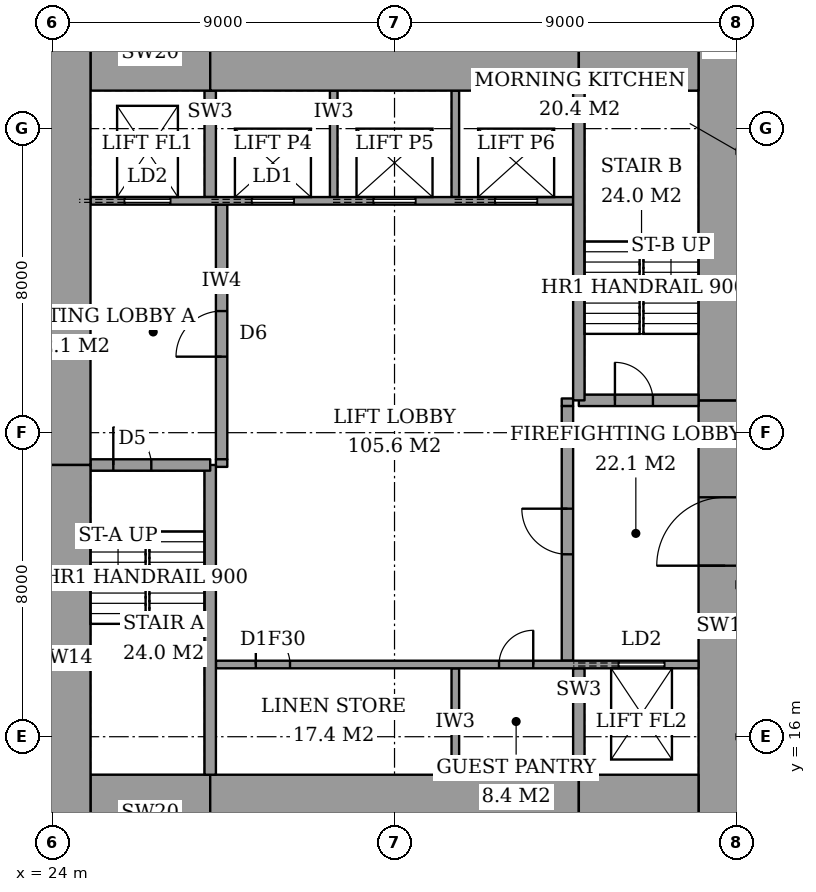
"""IFC4 building model, lengths in metres.
Left out: names, types, materials, properties, quantities, classifications, styles, units other than length and angle.
Written with IfcOpenShell. Run it as: python <this file> out.ifc"""

import sys

from ifc_helpers import new_model, si_unit, direction, frame, frame_2d, origin, place, context, subcontext, project, spatial, rectangle, extrude, element, fill, save


model = new_model("IFC4")
c1 = context("Model", 3, precision=1e-05, world=origin(), true_north=direction((0.0, 1.0)))
c2 = subcontext(c1, "Body", "Model", "MODEL_VIEW")
j1 = project(units=[si_unit("LENGTHUNIT", "METRE"), si_unit("PLANEANGLEUNIT", "RADIAN")], contexts=[c1])
p1 = place(None, origin())
s1 = spatial("IfcSite", under=j1, at=p1, CompositionType="ELEMENT")
p2 = place(p1, origin())
s2 = spatial("IfcBuilding", under=s1, at=p2, CompositionType="ELEMENT")
p3 = place(p2, frame((0.0, 0.0, 270.0)))
s3 = spatial("IfcBuildingStorey", under=s2, at=p3, CompositionType="ELEMENT", Elevation=270.0)
p4 = place(p3, frame((25.0, 14.0, 0.0), z_axis=(0.0, 0.0, 1.0), x_axis=(1.0, 0.0, 0.0)))
e1 = element("IfcWall", 1, at=p4, inside=s3, PredefinedType="SHEAR", context=c2, shape_type="SweptSolid", body=[
    extrude(rectangle(XDim=3.15, YDim=2.0, at=frame_2d((1.575, 0.0))), origin(), (0.0, 0.0, 1.0), 3.6),
])
p5 = place(p3, frame((28.15, 14.0, 0.0), z_axis=(0.0, 0.0, 1.0), x_axis=(1.0, 0.0, 0.0)))
e2 = element("IfcWall", 2, at=p5, inside=s3, PredefinedType="SHEAR", context=c2, shape_type="SweptSolid", body=[
    extrude(rectangle(XDim=9.7, YDim=2.0, at=frame_2d((4.85, 0.0))), origin(), (0.0, 0.0, 1.0), 3.6),
])
for number, where, z_axis, x_axis in (
    (3, (37.85, 14.0, 0.0), (0.0, 0.0, 1.0), (1.0, 0.0, 0.0)),
    (4, (25.0, 34.0, 0.0), (0.0, 0.0, 1.0), (1.0, 0.0, 0.0)),
):
    element("IfcWall", number, at=place(p3, frame(where, z_axis=z_axis, x_axis=x_axis)), inside=s3, PredefinedType="SHEAR", context=c2, shape_type="SweptSolid", body=[
        extrude(rectangle(XDim=3.15, YDim=2.0, at=frame_2d((1.575, 0.0))), origin(), (0.0, 0.0, 1.0), 3.6),
    ])
p6 = place(p3, frame((28.15, 34.0, 0.0), z_axis=(0.0, 0.0, 1.0), x_axis=(1.0, 0.0, 0.0)))
e5 = element("IfcWall", 5, at=p6, inside=s3, PredefinedType="SHEAR", context=c2, shape_type="SweptSolid", body=[
    extrude(rectangle(XDim=9.7, YDim=2.0, at=frame_2d((4.85, 0.0))), origin(), (0.0, 0.0, 1.0), 3.6),
])
p7 = place(p3, frame((37.85, 34.0, 0.0), z_axis=(0.0, 0.0, 1.0), x_axis=(1.0, 0.0, 0.0)))
e6 = element("IfcWall", 6, at=p7, inside=s3, PredefinedType="SHEAR", context=c2, shape_type="SweptSolid", body=[
    extrude(rectangle(XDim=3.15, YDim=2.0, at=frame_2d((1.575, 0.0))), origin(), (0.0, 0.0, 1.0), 3.6),
])
p8 = place(p3, frame((24.3, 13.0, 0.0), z_axis=(0.0, 0.0, 1.0), x_axis=(0.0, 1.0, 0.0)))
e7 = element("IfcWall", 7, at=p8, inside=s3, PredefinedType="SHEAR", context=c2, shape_type="SweptSolid", body=[
    extrude(rectangle(XDim=10.15, YDim=1.4, at=frame_2d((5.075, 0.0))), origin(), (0.0, 0.0, 1.0), 3.6),
])
p9 = place(p3, frame((24.3, 23.15, 0.0), z_axis=(0.0, 0.0, 1.0), x_axis=(0.0, 1.0, 0.0)))
e8 = element("IfcWall", 8, at=p9, inside=s3, PredefinedType="SHEAR", context=c2, shape_type="SweptSolid", body=[
    extrude(rectangle(XDim=11.85, YDim=1.4, at=frame_2d((5.925, 0.0))), origin(), (0.0, 0.0, 1.0), 3.6),
])
p10 = place(p3, frame((41.7, 13.0, 0.0), z_axis=(0.0, 0.0, 1.0), x_axis=(0.0, 1.0, 0.0)))
e9 = element("IfcWall", 9, at=p10, inside=s3, PredefinedType="SHEAR", context=c2, shape_type="SweptSolid", body=[
    extrude(rectangle(XDim=11.85, YDim=1.4, at=frame_2d((5.925, 0.0))), origin(), (0.0, 0.0, 1.0), 3.6),
])
p11 = place(p10, frame((7.5, 0.0, 0.0)))
e10 = element("IfcOpeningElement", 10, at=p11, cuts=e9, PredefinedType="OPENING", context=c2, shape_type="SweptSolid", body=[
    extrude(rectangle(XDim=1.8, YDim=2.4, at=frame_2d((0.9, 1.2))), frame((0.0, 0.71, 0.0), z_axis=(0.0, -1.0, 0.0), x_axis=(1.0, 0.0, 0.0)), (0.0, 0.0, 1.0), 1.42),
])
p12 = place(p3, frame((41.7, 24.85, 0.0), z_axis=(0.0, 0.0, 1.0), x_axis=(0.0, 1.0, 0.0)))
e11 = element("IfcWall", 11, at=p12, inside=s3, PredefinedType="SHEAR", context=c2, shape_type="SweptSolid", body=[
    extrude(rectangle(XDim=10.15, YDim=1.4, at=frame_2d((5.075, 0.0))), origin(), (0.0, 0.0, 1.0), 3.6),
])
p13 = place(p3, frame((28.15, 15.0, 0.0), z_axis=(0.0, 0.0, 1.0), x_axis=(0.0, 1.0, 0.0)))
e12 = element("IfcWall", 12, at=p13, inside=s3, PredefinedType="SHEAR", context=c2, shape_type="SweptSolid", body=[
    extrude(rectangle(XDim=8.15, YDim=0.3, at=frame_2d((4.075, 0.0))), origin(), (0.0, 0.0, 1.0), 3.6),
])
p14 = place(p3, frame((25.0, 23.15, 0.0), z_axis=(0.0, 0.0, 1.0), x_axis=(1.0, 0.0, 0.0)))
e13 = element("IfcWall", 13, at=p14, inside=s3, PredefinedType="SHEAR", context=c2, shape_type="SweptSolid", body=[
    extrude(rectangle(XDim=3.15, YDim=0.3, at=frame_2d((1.575, 0.0))), origin(), (0.0, 0.0, 1.0), 3.6),
])
p15 = place(p14, frame((0.6, 0.0, 0.0)))
e14 = element("IfcOpeningElement", 14, at=p15, cuts=e13, PredefinedType="OPENING", context=c2, shape_type="SweptSolid", body=[
    extrude(rectangle(XDim=1.0, YDim=2.1, at=frame_2d((0.5, 1.05))), frame((0.0, 0.16, 0.0), z_axis=(0.0, -1.0, 0.0), x_axis=(1.0, 0.0, 0.0)), (0.0, 0.0, 1.0), 0.32),
])
p16 = place(p3, frame((37.85, 24.85, 0.0), z_axis=(0.0, 0.0, 1.0), x_axis=(0.0, 1.0, 0.0)))
e15 = element("IfcWall", 15, at=p16, inside=s3, PredefinedType="SHEAR", context=c2, shape_type="SweptSolid", body=[
    extrude(rectangle(XDim=8.15, YDim=0.3, at=frame_2d((4.075, 0.0))), origin(), (0.0, 0.0, 1.0), 3.6),
])
p17 = place(p3, frame((37.85, 24.85, 0.0), z_axis=(0.0, 0.0, 1.0), x_axis=(1.0, 0.0, 0.0)))
e16 = element("IfcWall", 16, at=p17, inside=s3, PredefinedType="SHEAR", context=c2, shape_type="SweptSolid", body=[
    extrude(rectangle(XDim=3.15, YDim=0.3, at=frame_2d((1.575, 0.0))), origin(), (0.0, 0.0, 1.0), 3.6),
])
p18 = place(p17, frame((0.95, 0.0, 0.0)))
e17 = element("IfcOpeningElement", 17, at=p18, cuts=e16, PredefinedType="OPENING", context=c2, shape_type="SweptSolid", body=[
    extrude(rectangle(XDim=1.0, YDim=2.1, at=frame_2d((0.5, 1.05))), frame((0.0, 0.16, 0.0), z_axis=(0.0, -1.0, 0.0), x_axis=(1.0, 0.0, 0.0)), (0.0, 0.0, 1.0), 0.32),
])
p19 = place(p3, frame((28.45, 23.3, 0.0), z_axis=(0.0, 0.0, 1.0), x_axis=(0.0, 1.0, 0.0)))
e18 = element("IfcWall", 18, at=p19, inside=s3, PredefinedType="PARTITIONING", context=c2, shape_type="SweptSolid", body=[
    extrude(rectangle(XDim=6.7, YDim=0.3, at=frame_2d((3.35, 0.0))), origin(), (0.0, 0.0, 1.0), 3.6),
])
p20 = place(p19, frame((2.7, 0.0, 0.0)))
e19 = element("IfcOpeningElement", 19, at=p20, cuts=e18, PredefinedType="OPENING", context=c2, shape_type="SweptSolid", body=[
    extrude(rectangle(XDim=1.2, YDim=2.1, at=frame_2d((0.6, 1.05))), frame((0.0, 0.16, 0.0), z_axis=(0.0, -1.0, 0.0), x_axis=(1.0, 0.0, 0.0)), (0.0, 0.0, 1.0), 0.32),
])
p21 = place(p3, frame((37.55, 18.0, 0.0), z_axis=(0.0, 0.0, 1.0), x_axis=(0.0, 1.0, 0.0)))
e20 = element("IfcWall", 20, at=p21, inside=s3, PredefinedType="PARTITIONING", context=c2, shape_type="SweptSolid", body=[
    extrude(rectangle(XDim=6.7, YDim=0.3, at=frame_2d((3.35, 0.0))), origin(), (0.0, 0.0, 1.0), 3.6),
])
p22 = place(p21, frame((2.8, 0.0, 0.0)))
e21 = element("IfcOpeningElement", 21, at=p22, cuts=e20, PredefinedType="OPENING", context=c2, shape_type="SweptSolid", body=[
    extrude(rectangle(XDim=1.2, YDim=2.1, at=frame_2d((0.6, 1.05))), frame((0.0, 0.16, 0.0), z_axis=(0.0, -1.0, 0.0), x_axis=(1.0, 0.0, 0.0)), (0.0, 0.0, 1.0), 0.32),
])
p23 = place(p3, frame((28.3, 17.9, 0.0), z_axis=(0.0, 0.0, 1.0), x_axis=(1.0, 0.0, 0.0)))
e22 = element("IfcWall", 22, at=p23, inside=s3, PredefinedType="PARTITIONING", context=c2, shape_type="SweptSolid", body=[
    extrude(rectangle(XDim=12.7, YDim=0.2, at=frame_2d((6.35, 0.0))), origin(), (0.0, 0.0, 1.0), 3.6),
])
p24 = place(p23, frame((1.05, 0.0, 0.0)))
e23 = element("IfcOpeningElement", 23, at=p24, cuts=e22, PredefinedType="OPENING", context=c2, shape_type="SweptSolid", body=[
    extrude(rectangle(XDim=0.9, YDim=2.1, at=frame_2d((0.45, 1.05))), frame((0.0, 0.11, 0.0), z_axis=(0.0, -1.0, 0.0), x_axis=(1.0, 0.0, 0.0)), (0.0, 0.0, 1.0), 0.22),
])
p25 = place(p23, frame((7.45, 0.0, 0.0)))
e24 = element("IfcOpeningElement", 24, at=p25, cuts=e22, PredefinedType="OPENING", context=c2, shape_type="SweptSolid", body=[
    extrude(rectangle(XDim=0.9, YDim=2.1, at=frame_2d((0.45, 1.05))), frame((0.0, 0.11, 0.0), z_axis=(0.0, -1.0, 0.0), x_axis=(1.0, 0.0, 0.0)), (0.0, 0.0, 1.0), 0.22),
])
p26 = place(p23, frame((10.6, 0.0, 0.0)))
e25 = element("IfcOpeningElement", 25, at=p26, cuts=e22, PredefinedType="OPENING", context=c2, shape_type="SweptSolid", body=[
    extrude(rectangle(XDim=1.2, YDim=2.1, at=frame_2d((0.6, 1.05))), frame((0.0, 0.11, 0.0), z_axis=(0.0, -1.0, 0.0), x_axis=(1.0, 0.0, 0.0)), (0.0, 0.0, 1.0), 0.22),
])
p27 = place(p3, frame((25.0, 30.1, 0.0), z_axis=(0.0, 0.0, 1.0), x_axis=(1.0, 0.0, 0.0)))
e26 = element("IfcWall", 26, at=p27, inside=s3, PredefinedType="PARTITIONING", context=c2, shape_type="SweptSolid", body=[
    extrude(rectangle(XDim=12.7, YDim=0.2, at=frame_2d((6.35, 0.0))), origin(), (0.0, 0.0, 1.0), 3.6),
])
p28 = place(p27, frame((4.25, 0.0, 0.0)))
e27 = element("IfcOpeningElement", 27, at=p28, cuts=e26, PredefinedType="OPENING", context=c2, shape_type="SweptSolid", body=[
    extrude(rectangle(XDim=1.1, YDim=2.1, at=frame_2d((0.55, 1.05))), frame((0.0, 0.11, 0.0), z_axis=(0.0, -1.0, 0.0), x_axis=(1.0, 0.0, 0.0)), (0.0, 0.0, 1.0), 0.22),
])
p29 = place(p27, frame((7.45, 0.0, 0.0)))
e28 = element("IfcOpeningElement", 28, at=p29, cuts=e26, PredefinedType="OPENING", context=c2, shape_type="SweptSolid", body=[
    extrude(rectangle(XDim=1.1, YDim=2.1, at=frame_2d((0.55, 1.05))), frame((0.0, 0.11, 0.0), z_axis=(0.0, -1.0, 0.0), x_axis=(1.0, 0.0, 0.0)), (0.0, 0.0, 1.0), 0.22),
])
p30 = place(p27, frame((10.65, 0.0, 0.0)))
e29 = element("IfcOpeningElement", 29, at=p30, cuts=e26, PredefinedType="OPENING", context=c2, shape_type="SweptSolid", body=[
    extrude(rectangle(XDim=1.1, YDim=2.1, at=frame_2d((0.55, 1.05))), frame((0.0, 0.11, 0.0), z_axis=(0.0, -1.0, 0.0), x_axis=(1.0, 0.0, 0.0)), (0.0, 0.0, 1.0), 0.22),
])
p31 = place(p27, frame((0.9, 0.0, 0.0)))
e30 = element("IfcOpeningElement", 30, at=p31, cuts=e26, PredefinedType="OPENING", context=c2, shape_type="SweptSolid", body=[
    extrude(rectangle(XDim=1.2, YDim=2.1, at=frame_2d((0.6, 1.05))), frame((0.0, 0.11, 0.0), z_axis=(0.0, -1.0, 0.0), x_axis=(1.0, 0.0, 0.0)), (0.0, 0.0, 1.0), 0.22),
])
p32 = place(p3, frame((34.6, 15.0, 0.0), z_axis=(0.0, 0.0, 1.0), x_axis=(0.0, 1.0, 0.0)))
e31 = element("IfcWall", 31, at=p32, inside=s3, PredefinedType="PARTITIONING", context=c2, shape_type="SweptSolid", body=[
    extrude(rectangle(XDim=2.8, YDim=0.2, at=frame_2d((1.4, 0.0))), origin(), (0.0, 0.0, 1.0), 3.6),
])
p33 = place(p3, frame((37.85, 15.0, 0.0), z_axis=(0.0, 0.0, 1.0), x_axis=(0.0, 1.0, 0.0)))
e32 = element("IfcWall", 32, at=p33, inside=s3, PredefinedType="SHEAR", context=c2, shape_type="SweptSolid", body=[
    extrude(rectangle(XDim=2.8, YDim=0.3, at=frame_2d((1.4, 0.0))), origin(), (0.0, 0.0, 1.0), 3.6),
])
for number, where, z_axis, x_axis in (
    (33, (31.4, 30.2, 0.0), (0.0, 0.0, 1.0), (0.0, 1.0, 0.0)),
    (34, (34.6, 30.2, 0.0), (0.0, 0.0, 1.0), (0.0, 1.0, 0.0)),
):
    element("IfcWall", number, at=place(p3, frame(where, z_axis=z_axis, x_axis=x_axis)), inside=s3, PredefinedType="PARTITIONING", context=c2, shape_type="SweptSolid", body=[
        extrude(rectangle(XDim=2.8, YDim=0.2, at=frame_2d((1.4, 0.0))), origin(), (0.0, 0.0, 1.0), 3.6),
    ])
p34 = place(p3, frame((28.15, 30.2, 0.0), z_axis=(0.0, 0.0, 1.0), x_axis=(0.0, 1.0, 0.0)))
e35 = element("IfcWall", 35, at=p34, inside=s3, PredefinedType="SHEAR", context=c2, shape_type="SweptSolid", body=[
    extrude(rectangle(XDim=2.8, YDim=0.3, at=frame_2d((1.4, 0.0))), origin(), (0.0, 0.0, 1.0), 3.6),
])
for number, where, z_axis, x_axis in (
    (36, (28.3, 23.2, 0.0), (0.0, 0.0, 1.0), (1.0, 0.0, 0.0)),
    (37, (37.4, 24.8, 0.0), (0.0, 0.0, 1.0), (1.0, 0.0, 0.0)),
):
    element("IfcWall", number, at=place(p3, frame(where, z_axis=z_axis, x_axis=x_axis)), inside=s3, PredefinedType="PARTITIONING", context=c2, shape_type="SweptSolid", body=[
        extrude(rectangle(XDim=0.3, YDim=0.2, at=frame_2d((0.15, 0.0))), origin(), (0.0, 0.0, 1.0), 3.6),
    ])
p35 = place(p15, origin())
e38 = element("IfcDoor", 38, at=p35, inside=s3, OperationType="SINGLE_SWING_RIGHT", PredefinedType="DOOR", context=c2, shape_type="SweptSolid", body=[
    extrude(rectangle(XDim=1.0, YDim=2.1, at=frame_2d((0.5, 1.05))), frame((0.0, 0.025, 0.0), z_axis=(0.0, -1.0, 0.0), x_axis=(1.0, 0.0, 0.0)), (0.0, 0.0, 1.0), 0.05),
])
fill(e14, e38)
p36 = place(p18, origin())
e39 = element("IfcDoor", 39, at=p36, inside=s3, OperationType="SINGLE_SWING_RIGHT", PredefinedType="DOOR", context=c2, shape_type="SweptSolid", body=[
    extrude(rectangle(XDim=1.0, YDim=2.1, at=frame_2d((0.5, 1.05))), frame((0.0, 0.025, 0.0), z_axis=(0.0, -1.0, 0.0), x_axis=(1.0, 0.0, 0.0)), (0.0, 0.0, 1.0), 0.05),
])
fill(e17, e39)
p37 = place(p20, origin())
e40 = element("IfcDoor", 40, at=p37, inside=s3, OperationType="SINGLE_SWING_RIGHT", PredefinedType="DOOR", context=c2, shape_type="SweptSolid", body=[
    extrude(rectangle(XDim=1.2, YDim=2.1, at=frame_2d((0.6, 1.05))), frame((0.0, 0.025, 0.0), z_axis=(0.0, -1.0, 0.0), x_axis=(1.0, 0.0, 0.0)), (0.0, 0.0, 1.0), 0.05),
])
fill(e19, e40)
p38 = place(p22, origin())
e41 = element("IfcDoor", 41, at=p38, inside=s3, OperationType="SINGLE_SWING_LEFT", PredefinedType="DOOR", context=c2, shape_type="SweptSolid", body=[
    extrude(rectangle(XDim=1.2, YDim=2.1, at=frame_2d((0.6, 1.05))), frame((0.0, 0.025, 0.0), z_axis=(0.0, -1.0, 0.0), x_axis=(1.0, 0.0, 0.0)), (0.0, 0.0, 1.0), 0.05),
])
fill(e21, e41)
p39 = place(p11, origin())
e42 = element("IfcDoor", 42, at=p39, inside=s3, OperationType="DOUBLE_DOOR_DOUBLE_SWING", PredefinedType="DOOR", context=c2, shape_type="SweptSolid", body=[
    extrude(rectangle(XDim=1.8, YDim=2.4, at=frame_2d((0.9, 1.2))), frame((0.0, 0.025, 0.0), z_axis=(0.0, -1.0, 0.0), x_axis=(1.0, 0.0, 0.0)), (0.0, 0.0, 1.0), 0.05),
])
fill(e10, e42)
p40 = place(p24, origin())
e43 = element("IfcDoor", 43, at=p40, inside=s3, OperationType="SINGLE_SWING_RIGHT", PredefinedType="DOOR", context=c2, shape_type="SweptSolid", body=[
    extrude(rectangle(XDim=0.9, YDim=2.1, at=frame_2d((0.45, 1.05))), frame((0.0, 0.025, 0.0), z_axis=(0.0, -1.0, 0.0), x_axis=(1.0, 0.0, 0.0)), (0.0, 0.0, 1.0), 0.05),
])
fill(e23, e43)
p41 = place(p25, origin())
e44 = element("IfcDoor", 44, at=p41, inside=s3, OperationType="SINGLE_SWING_LEFT", PredefinedType="DOOR", context=c2, shape_type="SweptSolid", body=[
    extrude(rectangle(XDim=0.9, YDim=2.1, at=frame_2d((0.45, 1.05))), frame((0.0, 0.025, 0.0), z_axis=(0.0, -1.0, 0.0), x_axis=(1.0, 0.0, 0.0)), (0.0, 0.0, 1.0), 0.05),
])
fill(e24, e44)
p42 = place(p28, origin())
e45 = element("IfcDoor", 45, at=p42, inside=s3, OperationType="SLIDING_TO_LEFT", PredefinedType="DOOR", context=c2, shape_type="SweptSolid", body=[
    extrude(rectangle(XDim=1.1, YDim=2.1, at=frame_2d((0.55, 1.05))), frame((0.0, 0.025, 0.0), z_axis=(0.0, -1.0, 0.0), x_axis=(1.0, 0.0, 0.0)), (0.0, 0.0, 1.0), 0.05),
])
fill(e27, e45)
p43 = place(p29, origin())
e46 = element("IfcDoor", 46, at=p43, inside=s3, OperationType="SLIDING_TO_LEFT", PredefinedType="DOOR", context=c2, shape_type="SweptSolid", body=[
    extrude(rectangle(XDim=1.1, YDim=2.1, at=frame_2d((0.55, 1.05))), frame((0.0, 0.025, 0.0), z_axis=(0.0, -1.0, 0.0), x_axis=(1.0, 0.0, 0.0)), (0.0, 0.0, 1.0), 0.05),
])
fill(e28, e46)
p44 = place(p30, origin())
e47 = element("IfcDoor", 47, at=p44, inside=s3, OperationType="SLIDING_TO_LEFT", PredefinedType="DOOR", context=c2, shape_type="SweptSolid", body=[
    extrude(rectangle(XDim=1.1, YDim=2.1, at=frame_2d((0.55, 1.05))), frame((0.0, 0.025, 0.0), z_axis=(0.0, -1.0, 0.0), x_axis=(1.0, 0.0, 0.0)), (0.0, 0.0, 1.0), 0.05),
])
fill(e29, e47)
p45 = place(p31, origin())
e48 = element("IfcDoor", 48, at=p45, inside=s3, OperationType="SLIDING_TO_LEFT", PredefinedType="DOOR", context=c2, shape_type="SweptSolid", body=[
    extrude(rectangle(XDim=1.2, YDim=2.1, at=frame_2d((0.6, 1.05))), frame((0.0, 0.025, 0.0), z_axis=(0.0, -1.0, 0.0), x_axis=(1.0, 0.0, 0.0)), (0.0, 0.0, 1.0), 0.05),
])
fill(e30, e48)
p46 = place(p26, origin())
e49 = element("IfcDoor", 49, at=p46, inside=s3, OperationType="SLIDING_TO_LEFT", PredefinedType="DOOR", context=c2, shape_type="SweptSolid", body=[
    extrude(rectangle(XDim=1.2, YDim=2.1, at=frame_2d((0.6, 1.05))), frame((0.0, 0.025, 0.0), z_axis=(0.0, -1.0, 0.0), x_axis=(1.0, 0.0, 0.0)), (0.0, 0.0, 1.0), 0.05),
])
fill(e25, e49)
save(model, sys.argv[1])
